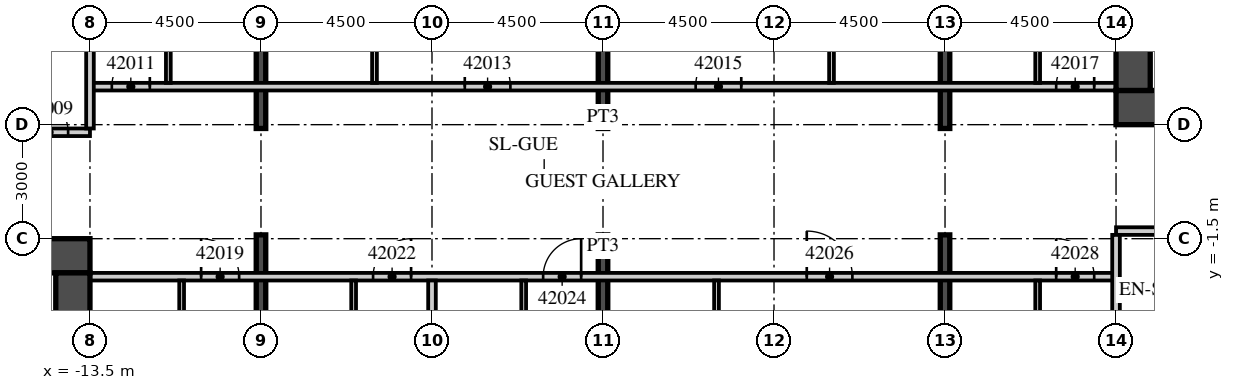
"""IFC4 building model, lengths in metres.
Left out: names, types, materials, properties, quantities, classifications, styles, units other than length and angle.
Written with IfcOpenShell. Run it as: python <this file> out.ifc"""

import sys

from ifc_helpers import new_model, si_unit, direction, frame, frame_2d, origin, place, context, subcontext, project, spatial, rectangle, extrude, element, fill, save


model = new_model("IFC4")
c1 = context("Model", 3, precision=1e-05, world=origin(), true_north=direction((0.0, 1.0)))
c2 = subcontext(c1, "Body", "Model", "MODEL_VIEW")
j1 = project(units=[si_unit("LENGTHUNIT", "METRE"), si_unit("PLANEANGLEUNIT", "RADIAN")], contexts=[c1])
p1 = place(None, origin())
s1 = spatial("IfcSite", under=j1, at=p1, CompositionType="ELEMENT")
p2 = place(p1, origin())
s2 = spatial("IfcBuilding", under=s1, at=p2, CompositionType="ELEMENT")
p3 = place(p2, frame((0.0, 0.0, 180.1)))
s3 = spatial("IfcBuildingStorey", under=s2, at=p3, CompositionType="ELEMENT", Elevation=180.1)
p4 = place(p3, frame((-9.0, -21.845, 0.0), z_axis=(0.0, 0.0, 1.0), x_axis=(0.0, 1.0, 0.0)))
e1 = element("IfcWall", 1, at=p4, inside=s3, PredefinedType="SHEAR", context=c2, shape_type="SweptSolid", body=[
    extrude(rectangle(XDim=20.445, YDim=0.25, at=frame_2d((10.223, 0.0))), origin(), (0.0, 0.0, 1.0), 3.3),
])
p5 = place(p3, frame((-9.0, 1.4, 0.0), z_axis=(0.0, 0.0, 1.0), x_axis=(0.0, 1.0, 0.0)))
e2 = element("IfcWall", 2, at=p5, inside=s3, PredefinedType="SHEAR", context=c2, shape_type="SweptSolid", body=[
    extrude(rectangle(XDim=18.001, YDim=0.25, at=frame_2d((9.0, 0.0))), origin(), (0.0, 0.0, 1.0), 3.3),
])
p6 = place(p3, frame((0.0, -20.979, 0.0), z_axis=(0.0, 0.0, 1.0), x_axis=(0.0, 1.0, 0.0)))
e3 = element("IfcWall", 3, at=p6, inside=s3, PredefinedType="SHEAR", context=c2, shape_type="SweptSolid", body=[
    extrude(rectangle(XDim=19.579, YDim=0.25, at=frame_2d((9.789, 0.0))), origin(), (0.0, 0.0, 1.0), 3.3),
])
p7 = place(p3, frame((0.0, 1.4, 0.0), z_axis=(0.0, 0.0, 1.0), x_axis=(0.0, 1.0, 0.0)))
e4 = element("IfcWall", 4, at=p7, inside=s3, PredefinedType="SHEAR", context=c2, shape_type="SweptSolid", body=[
    extrude(rectangle(XDim=18.867, YDim=0.25, at=frame_2d((9.434, 0.0))), origin(), (0.0, 0.0, 1.0), 3.3),
])
p8 = place(p3, frame((9.0, -20.112, 0.0), z_axis=(0.0, 0.0, 1.0), x_axis=(0.0, 1.0, 0.0)))
e5 = element("IfcWall", 5, at=p8, inside=s3, PredefinedType="SHEAR", context=c2, shape_type="SweptSolid", body=[
    extrude(rectangle(XDim=18.712, YDim=0.25, at=frame_2d((9.356, 0.0))), origin(), (0.0, 0.0, 1.0), 3.3),
])
p9 = place(p3, frame((9.0, 1.4, 0.0), z_axis=(0.0, 0.0, 1.0), x_axis=(0.0, 1.0, 0.0)))
e6 = element("IfcWall", 6, at=p9, inside=s3, PredefinedType="SHEAR", context=c2, shape_type="SweptSolid", body=[
    extrude(rectangle(XDim=19.734, YDim=0.25, at=frame_2d((9.867, 0.0))), origin(), (0.0, 0.0, 1.0), 3.3),
])
p10 = place(p3, frame((-42.913, 1.3, 0.0), z_axis=(0.0, 0.0, 1.0), x_axis=(1.0, 0.0, 0.0)))
e7 = element("IfcWall", 7, at=p10, inside=s3, PredefinedType="PARTITIONING", context=c2, shape_type="SweptSolid", body=[
    extrude(rectangle(XDim=29.413, YDim=0.2, at=frame_2d((14.707, 0.0))), origin(), (0.0, 0.0, 1.0), 3.02),
])
p11 = place(p10, frame((1.406, 0.0, 0.0)))
e8 = element("IfcOpeningElement", 8, at=p11, cuts=e7, PredefinedType="OPENING", context=c2, shape_type="SweptSolid", body=[
    extrude(rectangle(XDim=1.2, YDim=2.1, at=frame_2d((0.6, 1.05))), frame((0.0, 0.11, 0.0), z_axis=(0.0, -1.0, 0.0), x_axis=(1.0, 0.0, 0.0)), (0.0, 0.0, 1.0), 0.22),
])
p12 = place(p10, frame((12.275, 0.0, 0.0)))
e9 = element("IfcOpeningElement", 9, at=p12, cuts=e7, PredefinedType="OPENING", context=c2, shape_type="SweptSolid", body=[
    extrude(rectangle(XDim=1.2, YDim=2.1, at=frame_2d((0.6, 1.05))), frame((0.0, 0.11, 0.0), z_axis=(0.0, -1.0, 0.0), x_axis=(1.0, 0.0, 0.0)), (0.0, 0.0, 1.0), 0.22),
])
p13 = place(p10, frame((18.863, 0.0, 0.0)))
e10 = element("IfcOpeningElement", 10, at=p13, cuts=e7, PredefinedType="OPENING", context=c2, shape_type="SweptSolid", body=[
    extrude(rectangle(XDim=1.0, YDim=2.1, at=frame_2d((0.5, 1.05))), frame((0.0, 0.11, 0.0), z_axis=(0.0, -1.0, 0.0), x_axis=(1.0, 0.0, 0.0)), (0.0, 0.0, 1.0), 0.22),
])
p14 = place(p10, frame((23.338, 0.0, 0.0)))
e11 = element("IfcOpeningElement", 11, at=p14, cuts=e7, PredefinedType="OPENING", context=c2, shape_type="SweptSolid", body=[
    extrude(rectangle(XDim=1.0, YDim=2.1, at=frame_2d((0.5, 1.05))), frame((0.0, 0.11, 0.0), z_axis=(0.0, -1.0, 0.0), x_axis=(1.0, 0.0, 0.0)), (0.0, 0.0, 1.0), 0.22),
])
p15 = place(p10, frame((27.838, 0.0, 0.0)))
e12 = element("IfcOpeningElement", 12, at=p15, cuts=e7, PredefinedType="OPENING", context=c2, shape_type="SweptSolid", body=[
    extrude(rectangle(XDim=1.0, YDim=2.1, at=frame_2d((0.5, 1.05))), frame((0.0, 0.11, 0.0), z_axis=(0.0, -1.0, 0.0), x_axis=(1.0, 0.0, 0.0)), (0.0, 0.0, 1.0), 0.22),
])
p16 = place(p3, frame((-13.5, 2.5, 0.0), z_axis=(0.0, 0.0, 1.0), x_axis=(1.0, 0.0, 0.0)))
e13 = element("IfcWall", 13, at=p16, inside=s3, PredefinedType="PARTITIONING", context=c2, shape_type="SweptSolid", body=[
    extrude(rectangle(XDim=27.0, YDim=0.2, at=frame_2d((13.5, 0.0))), origin(), (0.0, 0.0, 1.0), 3.02),
])
p17 = place(p16, frame((0.575, 0.0, 0.0)))
e14 = element("IfcOpeningElement", 14, at=p17, cuts=e13, PredefinedType="OPENING", context=c2, shape_type="SweptSolid", body=[
    extrude(rectangle(XDim=1.0, YDim=2.1, at=frame_2d((0.5, 1.05))), frame((0.0, 0.11, 0.0), z_axis=(0.0, -1.0, 0.0), x_axis=(1.0, 0.0, 0.0)), (0.0, 0.0, 1.0), 0.22),
])
p18 = place(p16, frame((9.863, 0.0, 0.0)))
e15 = element("IfcOpeningElement", 15, at=p18, cuts=e13, PredefinedType="OPENING", context=c2, shape_type="SweptSolid", body=[
    extrude(rectangle(XDim=1.2, YDim=2.1, at=frame_2d((0.6, 1.05))), frame((0.0, 0.11, 0.0), z_axis=(0.0, -1.0, 0.0), x_axis=(1.0, 0.0, 0.0)), (0.0, 0.0, 1.0), 0.22),
])
p19 = place(p16, frame((15.938, 0.0, 0.0)))
e16 = element("IfcOpeningElement", 16, at=p19, cuts=e13, PredefinedType="OPENING", context=c2, shape_type="SweptSolid", body=[
    extrude(rectangle(XDim=1.2, YDim=2.1, at=frame_2d((0.6, 1.05))), frame((0.0, 0.11, 0.0), z_axis=(0.0, -1.0, 0.0), x_axis=(1.0, 0.0, 0.0)), (0.0, 0.0, 1.0), 0.22),
])
p20 = place(p16, frame((25.425, 0.0, 0.0)))
e17 = element("IfcOpeningElement", 17, at=p20, cuts=e13, PredefinedType="OPENING", context=c2, shape_type="SweptSolid", body=[
    extrude(rectangle(XDim=1.0, YDim=2.1, at=frame_2d((0.5, 1.05))), frame((0.0, 0.11, 0.0), z_axis=(0.0, -1.0, 0.0), x_axis=(1.0, 0.0, 0.0)), (0.0, 0.0, 1.0), 0.22),
])
p21 = place(p3, frame((-13.5, 1.4, 0.0), z_axis=(0.0, 0.0, 1.0), x_axis=(0.0, 1.0, 0.0)))
e18 = element("IfcWall", 18, at=p21, inside=s3, PredefinedType="PARTITIONING", context=c2, shape_type="SweptSolid", body=[
    extrude(rectangle(XDim=17.59, YDim=0.2, at=frame_2d((8.795, 0.0))), origin(), (0.0, 0.0, 1.0), 3.02),
])
p22 = place(p3, frame((-11.438, 2.6, 0.0), z_axis=(0.0, 0.0, 1.0), x_axis=(0.0, 1.0, 0.0)))
e19 = element("IfcWall", 19, at=p22, inside=s3, PredefinedType="PARTITIONING", context=c2, shape_type="SweptSolid", body=[
    extrude(rectangle(XDim=5.225, YDim=0.125, at=frame_2d((2.612, 0.0))), origin(), (0.0, 0.0, 1.0), 3.02),
])
p23 = place(p22, frame((2.45, 0.0, 0.0)))
e20 = element("IfcOpeningElement", 20, at=p23, cuts=e19, PredefinedType="OPENING", context=c2, shape_type="SweptSolid", body=[
    extrude(rectangle(XDim=0.9, YDim=2.1, at=frame_2d((0.45, 1.05))), frame((0.0, 0.073, 0.0), z_axis=(0.0, -1.0, 0.0), x_axis=(1.0, 0.0, 0.0)), (0.0, 0.0, 1.0), 0.145),
])
p24 = place(p3, frame((-6.013, 2.6, 0.0), z_axis=(0.0, 0.0, 1.0), x_axis=(0.0, 1.0, 0.0)))
e21 = element("IfcWall", 21, at=p24, inside=s3, PredefinedType="PARTITIONING", context=c2, shape_type="SweptSolid", body=[
    extrude(rectangle(XDim=5.225, YDim=0.125, at=frame_2d((2.612, 0.0))), origin(), (0.0, 0.0, 1.0), 3.02),
])
p25 = place(p24, frame((2.45, 0.0, 0.0)))
e22 = element("IfcOpeningElement", 22, at=p25, cuts=e21, PredefinedType="OPENING", context=c2, shape_type="SweptSolid", body=[
    extrude(rectangle(XDim=0.9, YDim=2.1, at=frame_2d((0.45, 1.05))), frame((0.0, 0.073, 0.0), z_axis=(0.0, -1.0, 0.0), x_axis=(1.0, 0.0, 0.0)), (0.0, 0.0, 1.0), 0.145),
])
p26 = place(p3, frame((6.013, 2.6, 0.0), z_axis=(0.0, 0.0, 1.0), x_axis=(0.0, 1.0, 0.0)))
e23 = element("IfcWall", 23, at=p26, inside=s3, PredefinedType="PARTITIONING", context=c2, shape_type="SweptSolid", body=[
    extrude(rectangle(XDim=5.225, YDim=0.125, at=frame_2d((2.612, 0.0))), origin(), (0.0, 0.0, 1.0), 3.02),
])
p27 = place(p26, frame((2.45, 0.0, 0.0)))
e24 = element("IfcOpeningElement", 24, at=p27, cuts=e23, PredefinedType="OPENING", context=c2, shape_type="SweptSolid", body=[
    extrude(rectangle(XDim=0.9, YDim=2.1, at=frame_2d((0.45, 1.05))), frame((0.0, 0.073, 0.0), z_axis=(0.0, -1.0, 0.0), x_axis=(1.0, 0.0, 0.0)), (0.0, 0.0, 1.0), 0.145),
])
p28 = place(p3, frame((11.438, 2.6, 0.0), z_axis=(0.0, 0.0, 1.0), x_axis=(0.0, 1.0, 0.0)))
e25 = element("IfcWall", 25, at=p28, inside=s3, PredefinedType="PARTITIONING", context=c2, shape_type="SweptSolid", body=[
    extrude(rectangle(XDim=5.225, YDim=0.125, at=frame_2d((2.612, 0.0))), origin(), (0.0, 0.0, 1.0), 3.02),
])
p29 = place(p28, frame((2.45, 0.0, 0.0)))
e26 = element("IfcOpeningElement", 26, at=p29, cuts=e25, PredefinedType="OPENING", context=c2, shape_type="SweptSolid", body=[
    extrude(rectangle(XDim=0.9, YDim=2.1, at=frame_2d((0.45, 1.05))), frame((0.0, 0.073, 0.0), z_axis=(0.0, -1.0, 0.0), x_axis=(1.0, 0.0, 0.0)), (0.0, 0.0, 1.0), 0.145),
])
p30 = place(p3, frame((-13.5, -2.5, 0.0), z_axis=(0.0, 0.0, 1.0), x_axis=(1.0, 0.0, 0.0)))
e27 = element("IfcWall", 27, at=p30, inside=s3, PredefinedType="PARTITIONING", context=c2, shape_type="SweptSolid", body=[
    extrude(rectangle(XDim=27.0, YDim=0.2, at=frame_2d((13.5, 0.0))), origin(), (0.0, 0.0, 1.0), 3.02),
])
p31 = place(p30, frame((2.925, 0.0, 0.0)))
e28 = element("IfcOpeningElement", 28, at=p31, cuts=e27, PredefinedType="OPENING", context=c2, shape_type="SweptSolid", body=[
    extrude(rectangle(XDim=1.0, YDim=2.1, at=frame_2d((0.5, 1.05))), frame((0.0, 0.11, 0.0), z_axis=(0.0, -1.0, 0.0), x_axis=(1.0, 0.0, 0.0)), (0.0, 0.0, 1.0), 0.22),
])
p32 = place(p30, frame((7.45, 0.0, 0.0)))
e29 = element("IfcOpeningElement", 29, at=p32, cuts=e27, PredefinedType="OPENING", context=c2, shape_type="SweptSolid", body=[
    extrude(rectangle(XDim=1.0, YDim=2.1, at=frame_2d((0.5, 1.05))), frame((0.0, 0.11, 0.0), z_axis=(0.0, -1.0, 0.0), x_axis=(1.0, 0.0, 0.0)), (0.0, 0.0, 1.0), 0.22),
])
p33 = place(p30, frame((11.925, 0.0, 0.0)))
e30 = element("IfcOpeningElement", 30, at=p33, cuts=e27, PredefinedType="OPENING", context=c2, shape_type="SweptSolid", body=[
    extrude(rectangle(XDim=1.0, YDim=2.1, at=frame_2d((0.5, 1.05))), frame((0.0, 0.11, 0.0), z_axis=(0.0, -1.0, 0.0), x_axis=(1.0, 0.0, 0.0)), (0.0, 0.0, 1.0), 0.22),
])
p34 = place(p30, frame((18.862, 0.0, 0.0)))
e31 = element("IfcOpeningElement", 31, at=p34, cuts=e27, PredefinedType="OPENING", context=c2, shape_type="SweptSolid", body=[
    extrude(rectangle(XDim=1.2, YDim=2.1, at=frame_2d((0.6, 1.05))), frame((0.0, 0.11, 0.0), z_axis=(0.0, -1.0, 0.0), x_axis=(1.0, 0.0, 0.0)), (0.0, 0.0, 1.0), 0.22),
])
p35 = place(p30, frame((25.425, 0.0, 0.0)))
e32 = element("IfcOpeningElement", 32, at=p35, cuts=e27, PredefinedType="OPENING", context=c2, shape_type="SweptSolid", body=[
    extrude(rectangle(XDim=1.0, YDim=2.1, at=frame_2d((0.5, 1.05))), frame((0.0, 0.11, 0.0), z_axis=(0.0, -1.0, 0.0), x_axis=(1.0, 0.0, 0.0)), (0.0, 0.0, 1.0), 0.22),
])
p36 = place(p3, frame((13.5, -1.3, 0.0), z_axis=(0.0, 0.0, 1.0), x_axis=(1.0, 0.0, 0.0)))
e33 = element("IfcWall", 33, at=p36, inside=s3, PredefinedType="PARTITIONING", context=c2, shape_type="SweptSolid", body=[
    extrude(rectangle(XDim=26.317, YDim=0.2, at=frame_2d((13.158, 0.0))), origin(), (0.0, 0.0, 1.0), 3.02),
])
p37 = place(p36, frame((2.925, 0.0, 0.0)))
e34 = element("IfcOpeningElement", 34, at=p37, cuts=e33, PredefinedType="OPENING", context=c2, shape_type="SweptSolid", body=[
    extrude(rectangle(XDim=1.0, YDim=2.1, at=frame_2d((0.5, 1.05))), frame((0.0, 0.11, 0.0), z_axis=(0.0, -1.0, 0.0), x_axis=(1.0, 0.0, 0.0)), (0.0, 0.0, 1.0), 0.22),
])
p38 = place(p36, frame((9.862, 0.0, 0.0)))
e35 = element("IfcOpeningElement", 35, at=p38, cuts=e33, PredefinedType="OPENING", context=c2, shape_type="SweptSolid", body=[
    extrude(rectangle(XDim=1.2, YDim=2.1, at=frame_2d((0.6, 1.05))), frame((0.0, 0.11, 0.0), z_axis=(0.0, -1.0, 0.0), x_axis=(1.0, 0.0, 0.0)), (0.0, 0.0, 1.0), 0.22),
])
p39 = place(p36, frame((15.938, 0.0, 0.0)))
e36 = element("IfcOpeningElement", 36, at=p39, cuts=e33, PredefinedType="OPENING", context=c2, shape_type="SweptSolid", body=[
    extrude(rectangle(XDim=1.2, YDim=2.1, at=frame_2d((0.6, 1.05))), frame((0.0, 0.11, 0.0), z_axis=(0.0, -1.0, 0.0), x_axis=(1.0, 0.0, 0.0)), (0.0, 0.0, 1.0), 0.22),
])
p40 = place(p36, frame((25.208, 0.0, 0.0)))
e37 = element("IfcOpeningElement", 37, at=p40, cuts=e33, PredefinedType="OPENING", context=c2, shape_type="SweptSolid", body=[
    extrude(rectangle(XDim=0.9, YDim=2.1, at=frame_2d((0.45, 1.05))), frame((0.0, 0.11, 0.0), z_axis=(0.0, -1.0, 0.0), x_axis=(1.0, 0.0, 0.0)), (0.0, 0.0, 1.0), 0.22),
])
p41 = place(p3, frame((-11.088, -7.825, 0.0), z_axis=(0.0, 0.0, 1.0), x_axis=(0.0, 1.0, 0.0)))
e38 = element("IfcWall", 38, at=p41, inside=s3, PredefinedType="PARTITIONING", context=c2, shape_type="SweptSolid", body=[
    extrude(rectangle(XDim=5.225, YDim=0.125, at=frame_2d((2.612, 0.0))), origin(), (0.0, 0.0, 1.0), 3.02),
])
p42 = place(p41, frame((1.875, 0.0, 0.0)))
e39 = element("IfcOpeningElement", 39, at=p42, cuts=e38, PredefinedType="OPENING", context=c2, shape_type="SweptSolid", body=[
    extrude(rectangle(XDim=0.9, YDim=2.1, at=frame_2d((0.45, 1.05))), frame((0.0, 0.073, 0.0), z_axis=(0.0, -1.0, 0.0), x_axis=(1.0, 0.0, 0.0)), (0.0, 0.0, 1.0), 0.145),
])
p43 = place(p3, frame((-4.5, -21.434, 0.0), z_axis=(0.0, 0.0, 1.0), x_axis=(0.0, 1.0, 0.0)))
e40 = element("IfcWall", 40, at=p43, inside=s3, PredefinedType="PARTITIONING", context=c2, shape_type="SweptSolid", body=[
    extrude(rectangle(XDim=18.834, YDim=0.2, at=frame_2d((9.417, 0.0))), origin(), (0.0, 0.0, 1.0), 3.02),
])
p44 = place(p3, frame((-6.562, -7.825, 0.0), z_axis=(0.0, 0.0, 1.0), x_axis=(0.0, 1.0, 0.0)))
e41 = element("IfcWall", 41, at=p44, inside=s3, PredefinedType="PARTITIONING", context=c2, shape_type="SweptSolid", body=[
    extrude(rectangle(XDim=5.225, YDim=0.125, at=frame_2d((2.612, 0.0))), origin(), (0.0, 0.0, 1.0), 3.02),
])
p45 = place(p44, frame((1.875, 0.0, 0.0)))
e42 = element("IfcOpeningElement", 42, at=p45, cuts=e41, PredefinedType="OPENING", context=c2, shape_type="SweptSolid", body=[
    extrude(rectangle(XDim=0.9, YDim=2.1, at=frame_2d((0.45, 1.05))), frame((0.0, 0.073, 0.0), z_axis=(0.0, -1.0, 0.0), x_axis=(1.0, 0.0, 0.0)), (0.0, 0.0, 1.0), 0.145),
])
p46 = place(p3, frame((-2.087, -7.825, 0.0), z_axis=(0.0, 0.0, 1.0), x_axis=(0.0, 1.0, 0.0)))
e43 = element("IfcWall", 43, at=p46, inside=s3, PredefinedType="PARTITIONING", context=c2, shape_type="SweptSolid", body=[
    extrude(rectangle(XDim=5.225, YDim=0.125, at=frame_2d((2.612, 0.0))), origin(), (0.0, 0.0, 1.0), 3.02),
])
p47 = place(p46, frame((1.875, 0.0, 0.0)))
e44 = element("IfcOpeningElement", 44, at=p47, cuts=e43, PredefinedType="OPENING", context=c2, shape_type="SweptSolid", body=[
    extrude(rectangle(XDim=0.9, YDim=2.1, at=frame_2d((0.45, 1.05))), frame((0.0, 0.073, 0.0), z_axis=(0.0, -1.0, 0.0), x_axis=(1.0, 0.0, 0.0)), (0.0, 0.0, 1.0), 0.145),
])
p48 = place(p3, frame((2.987, -7.825, 0.0), z_axis=(0.0, 0.0, 1.0), x_axis=(0.0, 1.0, 0.0)))
e45 = element("IfcWall", 45, at=p48, inside=s3, PredefinedType="PARTITIONING", context=c2, shape_type="SweptSolid", body=[
    extrude(rectangle(XDim=5.225, YDim=0.125, at=frame_2d((2.612, 0.0))), origin(), (0.0, 0.0, 1.0), 3.02),
])
p49 = place(p48, frame((1.875, 0.0, 0.0)))
e46 = element("IfcOpeningElement", 46, at=p49, cuts=e45, PredefinedType="OPENING", context=c2, shape_type="SweptSolid", body=[
    extrude(rectangle(XDim=0.9, YDim=2.1, at=frame_2d((0.45, 1.05))), frame((0.0, 0.073, 0.0), z_axis=(0.0, -1.0, 0.0), x_axis=(1.0, 0.0, 0.0)), (0.0, 0.0, 1.0), 0.145),
])
p50 = place(p3, frame((13.5, -19.701, 0.0), z_axis=(0.0, 0.0, 1.0), x_axis=(0.0, 1.0, 0.0)))
e47 = element("IfcWall", 47, at=p50, inside=s3, PredefinedType="PARTITIONING", context=c2, shape_type="SweptSolid", body=[
    extrude(rectangle(XDim=18.301, YDim=0.2, at=frame_2d((9.15, 0.0))), origin(), (0.0, 0.0, 1.0), 3.02),
])
p51 = place(p3, frame((11.438, -7.825, 0.0), z_axis=(0.0, 0.0, 1.0), x_axis=(0.0, 1.0, 0.0)))
e48 = element("IfcWall", 48, at=p51, inside=s3, PredefinedType="PARTITIONING", context=c2, shape_type="SweptSolid", body=[
    extrude(rectangle(XDim=5.225, YDim=0.125, at=frame_2d((2.612, 0.0))), origin(), (0.0, 0.0, 1.0), 3.02),
])
p52 = place(p51, frame((1.875, 0.0, 0.0)))
e49 = element("IfcOpeningElement", 49, at=p52, cuts=e48, PredefinedType="OPENING", context=c2, shape_type="SweptSolid", body=[
    extrude(rectangle(XDim=0.9, YDim=2.1, at=frame_2d((0.45, 1.05))), frame((0.0, 0.073, 0.0), z_axis=(0.0, -1.0, 0.0), x_axis=(1.0, 0.0, 0.0)), (0.0, 0.0, 1.0), 0.145),
])
p53 = place(p3, frame((-31.5, -1.95, 0.0), z_axis=(0.0, 0.0, 1.0), x_axis=(1.0, 0.0, 0.0)))
e50 = element("IfcWall", 50, at=p53, inside=s3, PredefinedType="SHEAR", context=c2, shape_type="SweptSolid", body=[
    extrude(rectangle(XDim=18.0, YDim=0.9, at=frame_2d((9.0, 0.0))), origin(), (0.0, 0.0, 1.0), 3.02),
])
p54 = place(p53, frame((14.725, 0.0, 0.0)))
e51 = element("IfcOpeningElement", 51, at=p54, cuts=e50, PredefinedType="OPENING", context=c2, shape_type="SweptSolid", body=[
    extrude(rectangle(XDim=1.8, YDim=2.1, at=frame_2d((0.9, 1.05))), frame((0.0, 0.46, 0.0), z_axis=(0.0, -1.0, 0.0), x_axis=(1.0, 0.0, 0.0)), (0.0, 0.0, 1.0), 0.92),
])
p55 = place(p3, frame((-13.95, -14.6, 0.0), z_axis=(0.0, 0.0, 1.0), x_axis=(0.0, 1.0, 0.0)))
e52 = element("IfcWall", 52, at=p55, inside=s3, PredefinedType="SHEAR", context=c2, shape_type="SweptSolid", body=[
    extrude(rectangle(XDim=12.2, YDim=0.9, at=frame_2d((6.1, 0.0))), origin(), (0.0, 0.0, 1.0), 3.02),
])
p56 = place(p3, frame((13.5, 1.95, 0.0), z_axis=(0.0, 0.0, 1.0), x_axis=(1.0, 0.0, 0.0)))
e53 = element("IfcWall", 53, at=p56, inside=s3, PredefinedType="SHEAR", context=c2, shape_type="SweptSolid", body=[
    extrude(rectangle(XDim=18.0, YDim=0.9, at=frame_2d((9.0, 0.0))), origin(), (0.0, 0.0, 1.0), 3.02),
])
p57 = place(p56, frame((1.475, 0.0, 0.0)))
e54 = element("IfcOpeningElement", 54, at=p57, cuts=e53, PredefinedType="OPENING", context=c2, shape_type="SweptSolid", body=[
    extrude(rectangle(XDim=1.8, YDim=2.1, at=frame_2d((0.9, 1.05))), frame((0.0, 0.46, 0.0), z_axis=(0.0, -1.0, 0.0), x_axis=(1.0, 0.0, 0.0)), (0.0, 0.0, 1.0), 0.92),
])
p58 = place(p3, frame((13.95, 2.4, 0.0), z_axis=(0.0, 0.0, 1.0), x_axis=(0.0, 1.0, 0.0)))
e55 = element("IfcWall", 55, at=p58, inside=s3, PredefinedType="SHEAR", context=c2, shape_type="SweptSolid", body=[
    extrude(rectangle(XDim=12.2, YDim=0.9, at=frame_2d((6.1, 0.0))), origin(), (0.0, 0.0, 1.0), 3.02),
])
p59 = place(p15, origin())
e56 = element("IfcDoor", 56, at=p59, inside=s3, OperationType="SINGLE_SWING_LEFT", PredefinedType="DOOR", context=c2, shape_type="SweptSolid", body=[
    extrude(rectangle(XDim=1.0, YDim=2.1, at=frame_2d((0.5, 1.05))), frame((0.0, 0.025, 0.0), z_axis=(0.0, -1.0, 0.0), x_axis=(1.0, 0.0, 0.0)), (0.0, 0.0, 1.0), 0.05),
])
fill(e12, e56)
p60 = place(p17, origin())
e57 = element("IfcDoor", 57, at=p60, inside=s3, OperationType="SINGLE_SWING_RIGHT", PredefinedType="DOOR", context=c2, shape_type="SweptSolid", body=[
    extrude(rectangle(XDim=1.0, YDim=2.1, at=frame_2d((0.5, 1.05))), frame((0.0, 0.025, 0.0), z_axis=(0.0, -1.0, 0.0), x_axis=(1.0, 0.0, 0.0)), (0.0, 0.0, 1.0), 0.05),
])
fill(e14, e57)
p61 = place(p18, origin())
e58 = element("IfcDoor", 58, at=p61, inside=s3, OperationType="SINGLE_SWING_LEFT", PredefinedType="DOOR", context=c2, shape_type="SweptSolid", body=[
    extrude(rectangle(XDim=1.2, YDim=2.1, at=frame_2d((0.6, 1.05))), frame((0.0, 0.025, 0.0), z_axis=(0.0, -1.0, 0.0), x_axis=(1.0, 0.0, 0.0)), (0.0, 0.0, 1.0), 0.05),
])
fill(e15, e58)
p62 = place(p19, origin())
e59 = element("IfcDoor", 59, at=p62, inside=s3, OperationType="SINGLE_SWING_RIGHT", PredefinedType="DOOR", context=c2, shape_type="SweptSolid", body=[
    extrude(rectangle(XDim=1.2, YDim=2.1, at=frame_2d((0.6, 1.05))), frame((0.0, 0.025, 0.0), z_axis=(0.0, -1.0, 0.0), x_axis=(1.0, 0.0, 0.0)), (0.0, 0.0, 1.0), 0.05),
])
fill(e16, e59)
p63 = place(p20, origin())
e60 = element("IfcDoor", 60, at=p63, inside=s3, OperationType="SINGLE_SWING_RIGHT", PredefinedType="DOOR", context=c2, shape_type="SweptSolid", body=[
    extrude(rectangle(XDim=1.0, YDim=2.1, at=frame_2d((0.5, 1.05))), frame((0.0, 0.025, 0.0), z_axis=(0.0, -1.0, 0.0), x_axis=(1.0, 0.0, 0.0)), (0.0, 0.0, 1.0), 0.05),
])
fill(e17, e60)
p64 = place(p31, origin())
e61 = element("IfcDoor", 61, at=p64, inside=s3, OperationType="SINGLE_SWING_LEFT", PredefinedType="DOOR", context=c2, shape_type="SweptSolid", body=[
    extrude(rectangle(XDim=1.0, YDim=2.1, at=frame_2d((0.5, 1.05))), frame((0.0, 0.025, 0.0), z_axis=(0.0, -1.0, 0.0), x_axis=(1.0, 0.0, 0.0)), (0.0, 0.0, 1.0), 0.05),
])
fill(e28, e61)
p65 = place(p32, origin())
e62 = element("IfcDoor", 62, at=p65, inside=s3, OperationType="SINGLE_SWING_RIGHT", PredefinedType="DOOR", context=c2, shape_type="SweptSolid", body=[
    extrude(rectangle(XDim=1.0, YDim=2.1, at=frame_2d((0.5, 1.05))), frame((0.0, 0.025, 0.0), z_axis=(0.0, -1.0, 0.0), x_axis=(1.0, 0.0, 0.0)), (0.0, 0.0, 1.0), 0.05),
])
fill(e29, e62)
p66 = place(p33, origin())
e63 = element("IfcDoor", 63, at=p66, inside=s3, OperationType="SINGLE_SWING_RIGHT", PredefinedType="DOOR", context=c2, shape_type="SweptSolid", body=[
    extrude(rectangle(XDim=1.0, YDim=2.1, at=frame_2d((0.5, 1.05))), frame((0.0, 0.025, 0.0), z_axis=(0.0, -1.0, 0.0), x_axis=(1.0, 0.0, 0.0)), (0.0, 0.0, 1.0), 0.05),
])
fill(e30, e63)
p67 = place(p34, origin())
e64 = element("IfcDoor", 64, at=p67, inside=s3, OperationType="SINGLE_SWING_LEFT", PredefinedType="DOOR", context=c2, shape_type="SweptSolid", body=[
    extrude(rectangle(XDim=1.2, YDim=2.1, at=frame_2d((0.6, 1.05))), frame((0.0, 0.025, 0.0), z_axis=(0.0, -1.0, 0.0), x_axis=(1.0, 0.0, 0.0)), (0.0, 0.0, 1.0), 0.05),
])
fill(e31, e64)
p68 = place(p35, origin())
e65 = element("IfcDoor", 65, at=p68, inside=s3, OperationType="SINGLE_SWING_LEFT", PredefinedType="DOOR", context=c2, shape_type="SweptSolid", body=[
    extrude(rectangle(XDim=1.0, YDim=2.1, at=frame_2d((0.5, 1.05))), frame((0.0, 0.025, 0.0), z_axis=(0.0, -1.0, 0.0), x_axis=(1.0, 0.0, 0.0)), (0.0, 0.0, 1.0), 0.05),
])
fill(e32, e65)
save(model, sys.argv[1])
